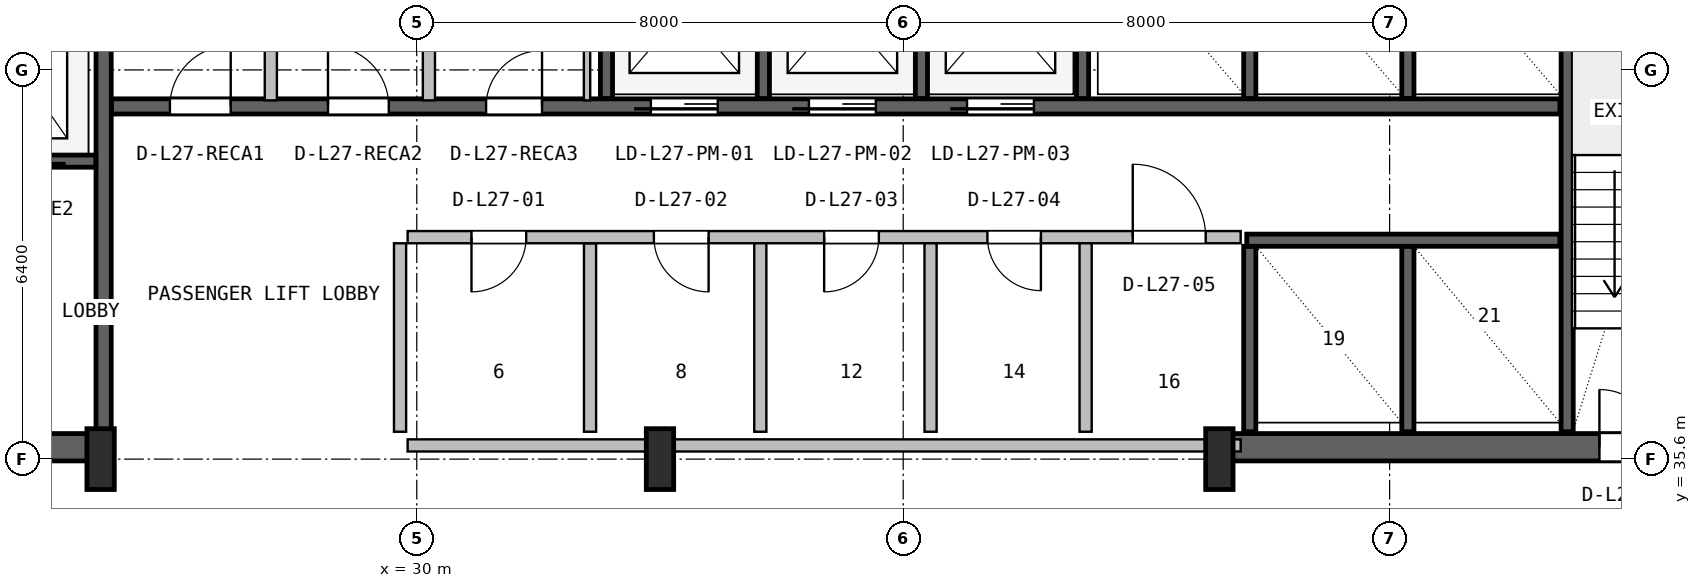
"""IFC4 building model, lengths in metres.
Left out: names, types, materials, properties, quantities, classifications, styles, units other than length and angle.
Written with IfcOpenShell. Run it as: python <this file> out.ifc"""

import sys

from ifc_helpers import new_model, si_unit, direction, frame, frame_2d, origin, origin_2d, place, context, subcontext, project, spatial, rectangle, i_section, extrude, source, transform, mapped, element, fill, save


model = new_model("IFC4")
c1 = context("Model", 3, precision=1e-05, world=origin(), true_north=direction((0.0, 1.0)))
c2 = subcontext(c1, "Body", "Model", "MODEL_VIEW")
j1 = project(units=[si_unit("LENGTHUNIT", "METRE"), si_unit("PLANEANGLEUNIT", "RADIAN")], contexts=[c1])
p1 = place(None, origin())
s1 = spatial("IfcSite", under=j1, at=p1, CompositionType="ELEMENT")
p2 = place(p1, origin())
s2 = spatial("IfcBuilding", under=s1, at=p2, CompositionType="ELEMENT")
p3 = place(p2, frame((0.0, 0.0, 114.4)))
s3 = spatial("IfcBuildingStorey", under=s2, at=p3, CompositionType="ELEMENT", Elevation=114.4)
p4 = place(p3, frame((15.57, 35.795, 0.0), z_axis=(0.0, 0.0, 1.0), x_axis=(1.0, 0.0, 0.0)))
e1 = element("IfcWall", 1, at=p4, inside=s3, PredefinedType="SHEAR", context=c2, shape_type="SweptSolid", body=[
    extrude(rectangle(XDim=9.23, YDim=0.45, at=frame_2d((4.615, 0.0))), origin(), (0.0, 0.0, 1.0), 3.55),
])
p5 = place(p4, frame((5.4, 0.0, 0.0)))
e2 = element("IfcOpeningElement", 2, at=p5, cuts=e1, PredefinedType="OPENING", context=c2, shape_type="SweptSolid", body=[
    extrude(rectangle(XDim=1.0, YDim=2.1, at=frame_2d((0.5, 1.05))), frame((0.0, 0.235, 0.0), z_axis=(0.0, -1.0, 0.0), x_axis=(1.0, 0.0, 0.0)), (0.0, 0.0, 1.0), 0.47),
])
p6 = place(p3, frame((43.2, 35.795, 0.0), z_axis=(0.0, 0.0, 1.0), x_axis=(1.0, 0.0, 0.0)))
e3 = element("IfcWall", 3, at=p6, inside=s3, PredefinedType="SHEAR", context=c2, shape_type="SweptSolid", body=[
    extrude(rectangle(XDim=9.23, YDim=0.45, at=frame_2d((4.615, 0.0))), origin(), (0.0, 0.0, 1.0), 3.55),
])
p7 = place(p6, frame((6.25, 0.0, 0.0)))
e4 = element("IfcOpeningElement", 4, at=p7, cuts=e3, PredefinedType="OPENING", context=c2, shape_type="SweptSolid", body=[
    extrude(rectangle(XDim=0.95, YDim=2.1, at=frame_2d((0.475, 1.05))), frame((0.0, 0.235, 0.0), z_axis=(0.0, -1.0, 0.0), x_axis=(1.0, 0.0, 0.0)), (0.0, 0.0, 1.0), 0.47),
])
m1 = source(origin(), c2, "Body", "SweptSolid", [
    extrude(i_section(OverallWidth=0.45, OverallDepth=1.0, WebThickness=0.016, FlangeThickness=0.03, FilletRadius=0.016, at=origin_2d()), origin(), (0.0, 0.0, 1.0), 3.8),
])
for number, where, z_axis, x_axis in (
    (5, (24.8, 35.6, 0.0), (0.0, 0.0, 1.0), (1.0, 0.0, 0.0)),
    (6, (34.0, 35.6, 0.0), (0.0, 0.0, 1.0), (1.0, 0.0, 0.0)),
    (7, (43.2, 35.6, 0.0), (0.0, 0.0, 1.0), (1.0, 0.0, 0.0)),
):
    element("IfcColumn", number, at=place(p3, frame(where, z_axis=z_axis, x_axis=x_axis)), inside=s3, PredefinedType="COLUMN", context=c2, shape_type="MappedRepresentation", body=[
        mapped(m1, transform((0.0, 0.0, 0.0), x_axis=(1.0, 0.0, 0.0), y_axis=(0.0, 1.0, 0.0), z_axis=(0.0, 0.0, 1.0), scale=1.0)),
    ])
p8 = place(p3, frame((24.85, 36.05, 0.0), z_axis=(0.0, 0.0, 1.0), x_axis=(0.0, 1.0, 0.0)))
e8 = element("IfcWall", 8, at=p8, inside=s3, PredefinedType="SHEAR", context=c2, shape_type="SweptSolid", body=[
    extrude(rectangle(XDim=10.45, YDim=0.25, at=frame_2d((5.225, 0.0))), origin(), (0.0, 0.0, 1.0), 3.55),
])
p9 = place(p3, frame((19.2, 40.5, 0.0), z_axis=(0.0, 0.0, 1.0), x_axis=(1.0, 0.0, 0.0)))
e9 = element("IfcWall", 9, at=p9, inside=s3, PredefinedType="SHEAR", context=c2, shape_type="SweptSolid", body=[
    extrude(rectangle(XDim=5.52, YDim=0.2, at=frame_2d((2.76, 0.0))), origin(), (0.0, 0.0, 1.0), 3.55),
])
p10 = place(p9, frame((1.05, 0.0, 0.0)))
e10 = element("IfcOpeningElement", 10, at=p10, cuts=e9, PredefinedType="OPENING", context=c2, shape_type="SweptSolid", body=[
    extrude(rectangle(XDim=1.1, YDim=2.18, at=frame_2d((0.55, 1.09))), frame((0.0, 0.11, 0.0), z_axis=(0.0, -1.0, 0.0), x_axis=(1.0, 0.0, 0.0)), (0.0, 0.0, 1.0), 0.22),
])
p11 = place(p9, frame((3.65, 0.0, 0.0)))
e11 = element("IfcOpeningElement", 11, at=p11, cuts=e9, PredefinedType="OPENING", context=c2, shape_type="SweptSolid", body=[
    extrude(rectangle(XDim=1.1, YDim=2.18, at=frame_2d((0.55, 1.09))), frame((0.0, 0.11, 0.0), z_axis=(0.0, -1.0, 0.0), x_axis=(1.0, 0.0, 0.0)), (0.0, 0.0, 1.0), 0.22),
])
p12 = place(p3, frame((48.92, 36.05, 0.0), z_axis=(0.0, 0.0, 1.0), x_axis=(0.0, 1.0, 0.0)))
e12 = element("IfcWall", 12, at=p12, inside=s3, PredefinedType="SHEAR", context=c2, shape_type="SweptSolid", body=[
    extrude(rectangle(XDim=10.5, YDim=0.2, at=frame_2d((5.25, 0.0))), origin(), (0.0, 0.0, 1.0), 3.55),
])
p13 = place(p3, frame((24.98, 41.4, 0.0), z_axis=(0.0, 0.0, 1.0), x_axis=(1.0, 0.0, 0.0)))
e13 = element("IfcWall", 13, at=p13, inside=s3, PredefinedType="SHEAR", context=c2, shape_type="SweptSolid", body=[
    extrude(rectangle(XDim=23.82, YDim=0.25, at=frame_2d((11.91, 0.0))), origin(), (0.0, 0.0, 1.0), 3.55),
])
p14 = place(p13, frame((8.87, 0.0, 0.0)))
e14 = element("IfcOpeningElement", 14, at=p14, cuts=e13, PredefinedType="OPENING", context=c2, shape_type="SweptSolid", body=[
    extrude(rectangle(XDim=1.1, YDim=2.18, at=frame_2d((0.55, 1.09))), frame((0.0, 0.135, 0.0), z_axis=(0.0, -1.0, 0.0), x_axis=(1.0, 0.0, 0.0)), (0.0, 0.0, 1.0), 0.27),
])
p15 = place(p13, frame((11.47, 0.0, 0.0)))
e15 = element("IfcOpeningElement", 15, at=p15, cuts=e13, PredefinedType="OPENING", context=c2, shape_type="SweptSolid", body=[
    extrude(rectangle(XDim=1.1, YDim=2.18, at=frame_2d((0.55, 1.09))), frame((0.0, 0.135, 0.0), z_axis=(0.0, -1.0, 0.0), x_axis=(1.0, 0.0, 0.0)), (0.0, 0.0, 1.0), 0.27),
])
p16 = place(p13, frame((14.07, 0.0, 0.0)))
e16 = element("IfcOpeningElement", 16, at=p16, cuts=e13, PredefinedType="OPENING", context=c2, shape_type="SweptSolid", body=[
    extrude(rectangle(XDim=1.1, YDim=2.18, at=frame_2d((0.55, 1.09))), frame((0.0, 0.135, 0.0), z_axis=(0.0, -1.0, 0.0), x_axis=(1.0, 0.0, 0.0)), (0.0, 0.0, 1.0), 0.27),
])
p17 = place(p13, frame((0.96, 0.0, 0.0)))
e17 = element("IfcOpeningElement", 17, at=p17, cuts=e13, PredefinedType="OPENING", context=c2, shape_type="SweptSolid", body=[
    extrude(rectangle(XDim=1.0, YDim=2.08, at=frame_2d((0.5, 1.04))), frame((0.0, 0.135, 0.0), z_axis=(0.0, -1.0, 0.0), x_axis=(1.0, 0.0, 0.0)), (0.0, 0.0, 1.0), 0.27),
])
p18 = place(p13, frame((3.56, 0.0, 0.0)))
e18 = element("IfcOpeningElement", 18, at=p18, cuts=e13, PredefinedType="OPENING", context=c2, shape_type="SweptSolid", body=[
    extrude(rectangle(XDim=1.0, YDim=2.08, at=frame_2d((0.5, 1.04))), frame((0.0, 0.135, 0.0), z_axis=(0.0, -1.0, 0.0), x_axis=(1.0, 0.0, 0.0)), (0.0, 0.0, 1.0), 0.27),
])
p19 = place(p13, frame((6.16, 0.0, 0.0)))
e19 = element("IfcOpeningElement", 19, at=p19, cuts=e13, PredefinedType="OPENING", context=c2, shape_type="SweptSolid", body=[
    extrude(rectangle(XDim=0.92, YDim=2.08, at=frame_2d((0.46, 1.04))), frame((0.0, 0.135, 0.0), z_axis=(0.0, -1.0, 0.0), x_axis=(1.0, 0.0, 0.0)), (0.0, 0.0, 1.0), 0.27),
])
p20 = place(p3, frame((33.12, 41.53, 0.0), z_axis=(0.0, 0.0, 1.0), x_axis=(0.0, 1.0, 0.0)))
e20 = element("IfcWall", 20, at=p20, inside=s3, PredefinedType="SHEAR", context=c2, shape_type="SweptSolid", body=[
    extrude(rectangle(XDim=5.02, YDim=0.2, at=frame_2d((2.51, 0.0))), origin(), (0.0, 0.0, 1.0), 3.55),
])
for number, where, z_axis, x_axis in (
    (21, (35.7, 41.53, 0.0), (0.0, 0.0, 1.0), (0.0, 1.0, 0.0)),
    (22, (38.3, 41.53, 0.0), (0.0, 0.0, 1.0), (0.0, 1.0, 0.0)),
):
    element("IfcWall", number, at=place(p3, frame(where, z_axis=z_axis, x_axis=x_axis)), inside=s3, PredefinedType="SHEAR", context=c2, shape_type="SweptSolid", body=[
        extrude(rectangle(XDim=2.87, YDim=0.2, at=frame_2d((1.435, 0.0))), origin(), (0.0, 0.0, 1.0), 3.55),
    ])
p21 = place(p3, frame((40.95, 41.53, 0.0), z_axis=(0.0, 0.0, 1.0), x_axis=(0.0, 1.0, 0.0)))
e23 = element("IfcWall", 23, at=p21, inside=s3, PredefinedType="SHEAR", context=c2, shape_type="SweptSolid", body=[
    extrude(rectangle(XDim=5.02, YDim=0.2, at=frame_2d((2.51, 0.0))), origin(), (0.0, 0.0, 1.0), 3.55),
])
for number, where, z_axis, x_axis in (
    (24, (43.7, 41.53, 0.0), (0.0, 0.0, 1.0), (0.0, 1.0, 0.0)),
    (25, (46.3, 41.53, 0.0), (0.0, 0.0, 1.0), (0.0, 1.0, 0.0)),
):
    element("IfcWall", number, at=place(p3, frame(where, z_axis=z_axis, x_axis=x_axis)), inside=s3, PredefinedType="SHEAR", context=c2, shape_type="SweptSolid", body=[
        extrude(rectangle(XDim=2.87, YDim=0.2, at=frame_2d((1.435, 0.0))), origin(), (0.0, 0.0, 1.0), 3.55),
    ])
for number, where, z_axis, x_axis in (
    (26, (43.7, 36.05, 0.0), (0.0, 0.0, 1.0), (0.0, 1.0, 0.0)),
    (27, (46.3, 36.05, 0.0), (0.0, 0.0, 1.0), (0.0, 1.0, 0.0)),
):
    element("IfcWall", number, at=place(p3, frame(where, z_axis=z_axis, x_axis=x_axis)), inside=s3, PredefinedType="SHEAR", context=c2, shape_type="SweptSolid", body=[
        extrude(rectangle(XDim=3.05, YDim=0.2, at=frame_2d((1.525, 0.0))), origin(), (0.0, 0.0, 1.0), 3.55),
    ])
p22 = place(p3, frame((43.65, 39.2, 0.0), z_axis=(0.0, 0.0, 1.0), x_axis=(1.0, 0.0, 0.0)))
e28 = element("IfcWall", 28, at=p22, inside=s3, PredefinedType="SHEAR", context=c2, shape_type="SweptSolid", body=[
    extrude(rectangle(XDim=5.15, YDim=0.2, at=frame_2d((2.575, 0.0))), origin(), (0.0, 0.0, 1.0), 3.55),
])
p23 = place(p3, frame((29.85, 35.825, 0.0), z_axis=(0.0, 0.0, 1.0), x_axis=(1.0, 0.0, 0.0)))
e29 = element("IfcWall", 29, at=p23, inside=s3, PredefinedType="SOLIDWALL", context=c2, shape_type="SweptSolid", body=[
    extrude(rectangle(XDim=13.7, YDim=0.2, at=frame_2d((6.85, 0.0))), origin(), (0.0, 0.0, 1.0), 2.325),
])
p24 = place(p3, frame((32.85, 36.05, 0.0), z_axis=(0.0, 0.0, 1.0), x_axis=(0.0, 1.0, 0.0)))
e30 = element("IfcWall", 30, at=p24, inside=s3, PredefinedType="PLUMBINGWALL", context=c2, shape_type="SweptSolid", body=[
    extrude(rectangle(XDim=3.1, YDim=0.2, at=frame_2d((1.55, 0.0))), origin(), (0.0, 0.0, 1.0), 3.53),
])
p25 = place(p3, frame((29.85, 39.25, 0.0), z_axis=(0.0, 0.0, 1.0), x_axis=(1.0, 0.0, 0.0)))
e31 = element("IfcWall", 31, at=p25, inside=s3, PredefinedType="SOLIDWALL", context=c2, shape_type="SweptSolid", body=[
    extrude(rectangle(XDim=13.7, YDim=0.2, at=frame_2d((6.85, 0.0))), origin(), (0.0, 0.0, 1.0), 3.53),
])
p26 = place(p25, frame((1.05, 0.0, 0.0)))
e32 = element("IfcOpeningElement", 32, at=p26, cuts=e31, PredefinedType="OPENING", context=c2, shape_type="SweptSolid", body=[
    extrude(rectangle(XDim=0.9, YDim=2.06, at=frame_2d((0.45, 1.03))), frame((0.0, 0.11, 0.0), z_axis=(0.0, -1.0, 0.0), x_axis=(1.0, 0.0, 0.0)), (0.0, 0.0, 1.0), 0.22),
])
p27 = place(p25, frame((4.05, 0.0, 0.0)))
e33 = element("IfcOpeningElement", 33, at=p27, cuts=e31, PredefinedType="OPENING", context=c2, shape_type="SweptSolid", body=[
    extrude(rectangle(XDim=0.9, YDim=2.06, at=frame_2d((0.45, 1.03))), frame((0.0, 0.11, 0.0), z_axis=(0.0, -1.0, 0.0), x_axis=(1.0, 0.0, 0.0)), (0.0, 0.0, 1.0), 0.22),
])
p28 = place(p25, frame((6.85, 0.0, 0.0)))
e34 = element("IfcOpeningElement", 34, at=p28, cuts=e31, PredefinedType="OPENING", context=c2, shape_type="SweptSolid", body=[
    extrude(rectangle(XDim=0.9, YDim=2.06, at=frame_2d((0.45, 1.03))), frame((0.0, 0.11, 0.0), z_axis=(0.0, -1.0, 0.0), x_axis=(1.0, 0.0, 0.0)), (0.0, 0.0, 1.0), 0.22),
])
p29 = place(p25, frame((9.535, 0.0, 0.0)))
e35 = element("IfcOpeningElement", 35, at=p29, cuts=e31, PredefinedType="OPENING", context=c2, shape_type="SweptSolid", body=[
    extrude(rectangle(XDim=0.88, YDim=2.06, at=frame_2d((0.44, 1.03))), frame((0.0, 0.11, 0.0), z_axis=(0.0, -1.0, 0.0), x_axis=(1.0, 0.0, 0.0)), (0.0, 0.0, 1.0), 0.22),
])
p30 = place(p25, frame((11.925, 0.0, 0.0)))
e36 = element("IfcOpeningElement", 36, at=p30, cuts=e31, PredefinedType="OPENING", context=c2, shape_type="SweptSolid", body=[
    extrude(rectangle(XDim=1.2, YDim=2.1, at=frame_2d((0.6, 1.05))), frame((0.0, 0.11, 0.0), z_axis=(0.0, -1.0, 0.0), x_axis=(1.0, 0.0, 0.0)), (0.0, 0.0, 1.0), 0.22),
])
for number, where, z_axis, x_axis in (
    (37, (29.725, 36.05, 0.0), (0.0, 0.0, 1.0), (0.0, 1.0, 0.0)),
    (38, (35.65, 36.05, 0.0), (0.0, 0.0, 1.0), (0.0, 1.0, 0.0)),
    (39, (38.45, 36.05, 0.0), (0.0, 0.0, 1.0), (0.0, 1.0, 0.0)),
):
    element("IfcWall", number, at=place(p3, frame(where, z_axis=z_axis, x_axis=x_axis)), inside=s3, PredefinedType="PLUMBINGWALL", context=c2, shape_type="SweptSolid", body=[
        extrude(rectangle(XDim=3.1, YDim=0.2, at=frame_2d((1.55, 0.0))), origin(), (0.0, 0.0, 1.0), 3.53),
    ])
p31 = place(p3, frame((41.0, 36.05, 0.0), z_axis=(0.0, 0.0, 1.0), x_axis=(0.0, 1.0, 0.0)))
e40 = element("IfcWall", 40, at=p31, inside=s3, PredefinedType="SOLIDWALL", context=c2, shape_type="SweptSolid", body=[
    extrude(rectangle(XDim=3.1, YDim=0.2, at=frame_2d((1.55, 0.0))), origin(), (0.0, 0.0, 1.0), 3.53),
])
for number, where, z_axis, x_axis in (
    (41, (27.6, 41.5, 0.0), (0.0, 0.0, 1.0), (0.0, 1.0, 0.0)),
    (42, (30.2, 41.5, 0.0), (0.0, 0.0, 1.0), (0.0, 1.0, 0.0)),
):
    element("IfcWall", number, at=place(p3, frame(where, z_axis=z_axis, x_axis=x_axis)), inside=s3, PredefinedType="SOLIDWALL", context=c2, shape_type="SweptSolid", body=[
        extrude(rectangle(XDim=5.02, YDim=0.2, at=frame_2d((2.51, 0.0))), origin(), (0.0, 0.0, 1.0), 3.53),
    ])
p32 = place(p3, frame((32.8, 41.5, 0.0), z_axis=(0.0, 0.0, 1.0), x_axis=(0.0, 1.0, 0.0)))
e43 = element("IfcWall", 43, at=p32, inside=s3, PredefinedType="PARTITIONING", context=c2, shape_type="SweptSolid", body=[
    extrude(rectangle(XDim=5.02, YDim=0.105, at=frame_2d((2.51, 0.0))), origin(), (0.0, 0.0, 1.0), 3.53),
])
m2 = source(origin(), c2, "Body", "SweptSolid", [
    extrude(rectangle(XDim=0.95, YDim=2.1, at=frame_2d((0.475, 1.05))), frame((0.0, 0.025, 0.0), z_axis=(0.0, -1.0, 0.0), x_axis=(1.0, 0.0, 0.0)), (0.0, 0.0, 1.0), 0.05),
])
p33 = place(p7, origin())
e44 = element("IfcDoor", 44, at=p33, inside=s3, OperationType="SINGLE_SWING_LEFT", PredefinedType="DOOR", context=c2, shape_type="MappedRepresentation", body=[
    mapped(m2, transform((0.0, 0.0, 0.0), x_axis=(1.0, 0.0, 0.0), y_axis=(0.0, 1.0, 0.0), z_axis=(0.0, 0.0, 1.0), scale=1.0)),
])
fill(e4, e44)
m3 = source(origin(), c2, "Body", "SweptSolid", [
    extrude(rectangle(XDim=1.1, YDim=2.18, at=frame_2d((0.55, 1.09))), frame((0.0, 0.025, 0.0), z_axis=(0.0, -1.0, 0.0), x_axis=(1.0, 0.0, 0.0)), (0.0, 0.0, 1.0), 0.05),
])
p34 = place(p14, frame((1.1, 0.0, 0.0), z_axis=(0.0, 0.0, 1.0), x_axis=(-1.0, 0.0, 0.0)))
e45 = element("IfcDoor", 45, at=p34, inside=s3, OperationType="SLIDING_TO_LEFT", PredefinedType="DOOR", context=c2, shape_type="MappedRepresentation", body=[
    mapped(m3, transform((0.0, 0.0, 0.0), x_axis=(1.0, 0.0, 0.0), y_axis=(0.0, 1.0, 0.0), z_axis=(0.0, 0.0, 1.0), scale=1.0)),
])
fill(e14, e45)
p35 = place(p15, frame((1.1, 0.0, 0.0), z_axis=(0.0, 0.0, 1.0), x_axis=(-1.0, 0.0, 0.0)))
e46 = element("IfcDoor", 46, at=p35, inside=s3, OperationType="SLIDING_TO_LEFT", PredefinedType="DOOR", context=c2, shape_type="MappedRepresentation", body=[
    mapped(m3, transform((0.0, 0.0, 0.0), x_axis=(1.0, 0.0, 0.0), y_axis=(0.0, 1.0, 0.0), z_axis=(0.0, 0.0, 1.0), scale=1.0)),
])
fill(e15, e46)
p36 = place(p16, frame((1.1, 0.0, 0.0), z_axis=(0.0, 0.0, 1.0), x_axis=(-1.0, 0.0, 0.0)))
e47 = element("IfcDoor", 47, at=p36, inside=s3, OperationType="SLIDING_TO_LEFT", PredefinedType="DOOR", context=c2, shape_type="MappedRepresentation", body=[
    mapped(m3, transform((0.0, 0.0, 0.0), x_axis=(1.0, 0.0, 0.0), y_axis=(0.0, 1.0, 0.0), z_axis=(0.0, 0.0, 1.0), scale=1.0)),
])
fill(e16, e47)
m4 = source(origin(), c2, "Body", "SweptSolid", [
    extrude(rectangle(XDim=1.0, YDim=2.08, at=frame_2d((0.5, 1.04))), frame((0.0, 0.025, 0.0), z_axis=(0.0, -1.0, 0.0), x_axis=(1.0, 0.0, 0.0)), (0.0, 0.0, 1.0), 0.05),
])
p37 = place(p17, origin())
e48 = element("IfcDoor", 48, at=p37, inside=s3, OperationType="SINGLE_SWING_RIGHT", PredefinedType="DOOR", context=c2, shape_type="MappedRepresentation", body=[
    mapped(m4, transform((0.0, 0.0, 0.0), x_axis=(1.0, 0.0, 0.0), y_axis=(0.0, 1.0, 0.0), z_axis=(0.0, 0.0, 1.0), scale=1.0)),
])
fill(e17, e48)
p38 = place(p18, origin())
e49 = element("IfcDoor", 49, at=p38, inside=s3, OperationType="SINGLE_SWING_LEFT", PredefinedType="DOOR", context=c2, shape_type="MappedRepresentation", body=[
    mapped(m4, transform((0.0, 0.0, 0.0), x_axis=(1.0, 0.0, 0.0), y_axis=(0.0, 1.0, 0.0), z_axis=(0.0, 0.0, 1.0), scale=1.0)),
])
fill(e18, e49)
m5 = source(origin(), c2, "Body", "SweptSolid", [
    extrude(rectangle(XDim=0.92, YDim=2.08, at=frame_2d((0.46, 1.04))), frame((0.0, 0.025, 0.0), z_axis=(0.0, -1.0, 0.0), x_axis=(1.0, 0.0, 0.0)), (0.0, 0.0, 1.0), 0.05),
])
p39 = place(p19, origin())
e50 = element("IfcDoor", 50, at=p39, inside=s3, OperationType="SINGLE_SWING_RIGHT", PredefinedType="DOOR", context=c2, shape_type="MappedRepresentation", body=[
    mapped(m5, transform((0.0, 0.0, 0.0), x_axis=(1.0, 0.0, 0.0), y_axis=(0.0, 1.0, 0.0), z_axis=(0.0, 0.0, 1.0), scale=1.0)),
])
fill(e19, e50)
m6 = source(origin(), c2, "Body", "SweptSolid", [
    extrude(rectangle(XDim=0.9, YDim=2.06, at=frame_2d((0.45, 1.03))), frame((0.0, 0.025, 0.0), z_axis=(0.0, -1.0, 0.0), x_axis=(1.0, 0.0, 0.0)), (0.0, 0.0, 1.0), 0.05),
])
p40 = place(p26, frame((0.9, 0.0, 0.0), z_axis=(0.0, 0.0, 1.0), x_axis=(-1.0, 0.0, 0.0)))
e51 = element("IfcDoor", 51, at=p40, inside=s3, OperationType="SINGLE_SWING_LEFT", PredefinedType="DOOR", context=c2, shape_type="MappedRepresentation", body=[
    mapped(m6, transform((0.0, 0.0, 0.0), x_axis=(1.0, 0.0, 0.0), y_axis=(0.0, 1.0, 0.0), z_axis=(0.0, 0.0, 1.0), scale=1.0)),
])
fill(e32, e51)
p41 = place(p27, frame((0.9, 0.0, 0.0), z_axis=(0.0, 0.0, 1.0), x_axis=(-1.0, 0.0, 0.0)))
e52 = element("IfcDoor", 52, at=p41, inside=s3, OperationType="SINGLE_SWING_RIGHT", PredefinedType="DOOR", context=c2, shape_type="MappedRepresentation", body=[
    mapped(m6, transform((0.0, 0.0, 0.0), x_axis=(1.0, 0.0, 0.0), y_axis=(0.0, 1.0, 0.0), z_axis=(0.0, 0.0, 1.0), scale=1.0)),
])
fill(e33, e52)
p42 = place(p28, frame((0.9, 0.0, 0.0), z_axis=(0.0, 0.0, 1.0), x_axis=(-1.0, 0.0, 0.0)))
e53 = element("IfcDoor", 53, at=p42, inside=s3, OperationType="SINGLE_SWING_LEFT", PredefinedType="DOOR", context=c2, shape_type="MappedRepresentation", body=[
    mapped(m6, transform((0.0, 0.0, 0.0), x_axis=(1.0, 0.0, 0.0), y_axis=(0.0, 1.0, 0.0), z_axis=(0.0, 0.0, 1.0), scale=1.0)),
])
fill(e34, e53)
m7 = source(origin(), c2, "Body", "SweptSolid", [
    extrude(rectangle(XDim=0.88, YDim=2.06, at=frame_2d((0.44, 1.03))), frame((0.0, 0.025, 0.0), z_axis=(0.0, -1.0, 0.0), x_axis=(1.0, 0.0, 0.0)), (0.0, 0.0, 1.0), 0.05),
])
p43 = place(p29, frame((0.88, 0.0, 0.0), z_axis=(0.0, 0.0, 1.0), x_axis=(-1.0, 0.0, 0.0)))
e54 = element("IfcDoor", 54, at=p43, inside=s3, OperationType="SINGLE_SWING_RIGHT", PredefinedType="DOOR", context=c2, shape_type="MappedRepresentation", body=[
    mapped(m7, transform((0.0, 0.0, 0.0), x_axis=(1.0, 0.0, 0.0), y_axis=(0.0, 1.0, 0.0), z_axis=(0.0, 0.0, 1.0), scale=1.0)),
])
fill(e35, e54)
m8 = source(origin(), c2, "Body", "SweptSolid", [
    extrude(rectangle(XDim=1.2, YDim=2.1, at=frame_2d((0.6, 1.05))), frame((0.0, 0.025, 0.0), z_axis=(0.0, -1.0, 0.0), x_axis=(1.0, 0.0, 0.0)), (0.0, 0.0, 1.0), 0.05),
])
p44 = place(p30, origin())
e55 = element("IfcDoor", 55, at=p44, inside=s3, OperationType="SINGLE_SWING_LEFT", PredefinedType="DOOR", context=c2, shape_type="MappedRepresentation", body=[
    mapped(m8, transform((0.0, 0.0, 0.0), x_axis=(1.0, 0.0, 0.0), y_axis=(0.0, 1.0, 0.0), z_axis=(0.0, 0.0, 1.0), scale=1.0)),
])
fill(e36, e55)
save(model, sys.argv[1])
